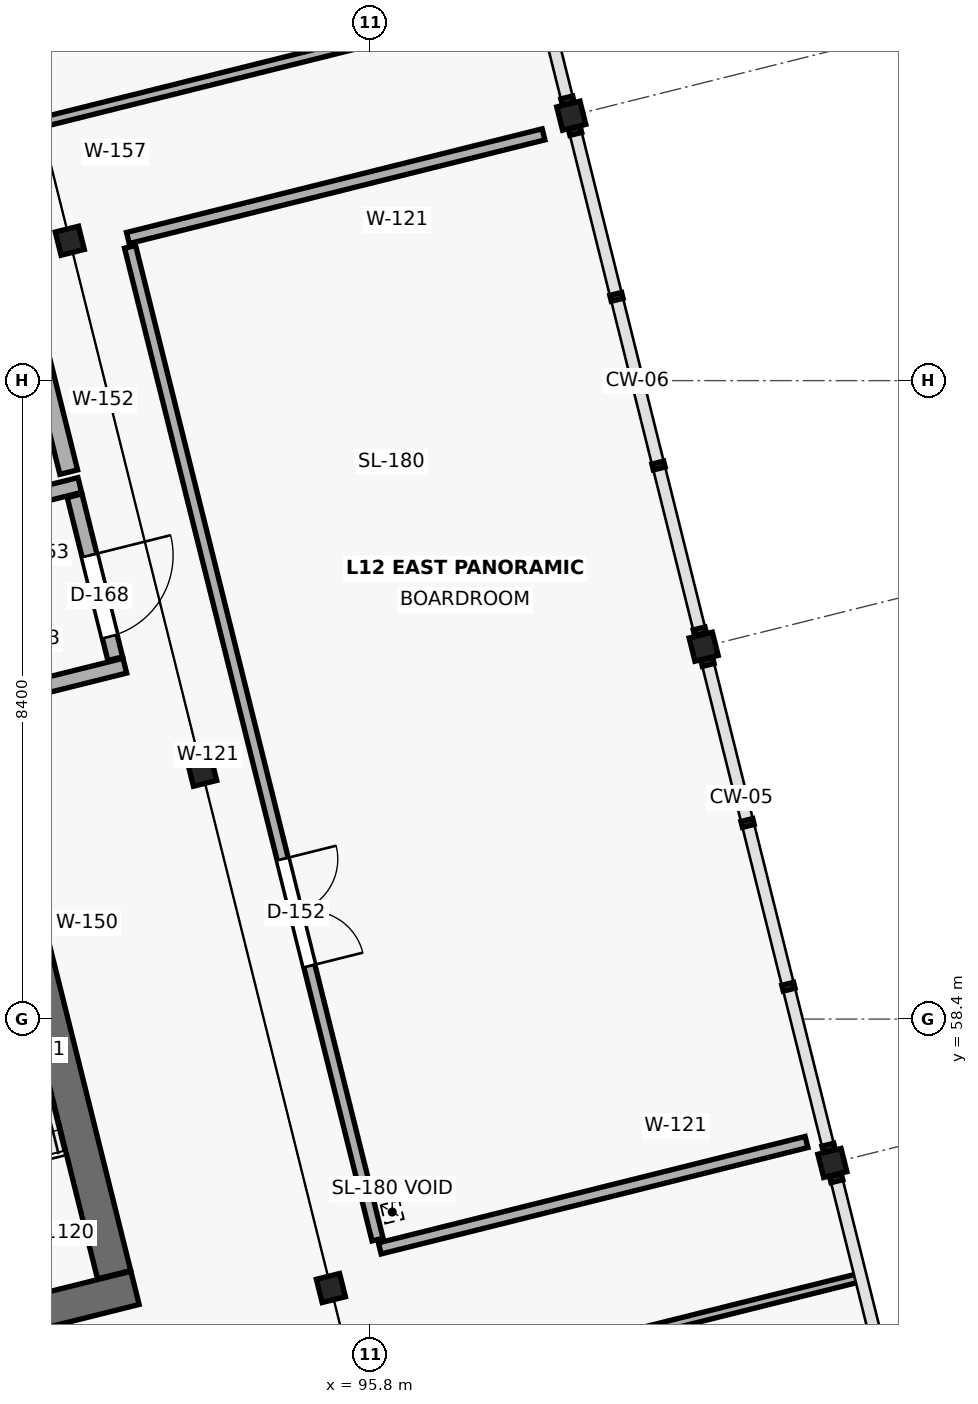
"""IFC4 building model, lengths in metres.
Left out: names, types, materials, properties, quantities, classifications, styles, units other than length and angle.
Written with IfcOpenShell. Run it as: python <this file> out.ifc"""

import sys

from ifc_helpers import new_model, si_unit, direction, frame, frame_2d, origin, origin_2d, place, context, subcontext, project, spatial, rectangle, extrude, element, fill, save


model = new_model("IFC4")
c1 = context("Model", 3, precision=1e-05, world=origin(), true_north=direction((0.0, 1.0)))
c2 = subcontext(c1, "Body", "Model", "MODEL_VIEW")
j1 = project(units=[si_unit("LENGTHUNIT", "METRE"), si_unit("PLANEANGLEUNIT", "RADIAN")], contexts=[c1])
p1 = place(None, origin())
s1 = spatial("IfcSite", under=j1, at=p1, CompositionType="ELEMENT")
p2 = place(p1, origin())
s2 = spatial("IfcBuilding", under=s1, at=p2, CompositionType="ELEMENT")
p3 = place(p2, frame((0.0, 0.0, 49.5)))
s3 = spatial("IfcBuildingStorey", under=s2, at=p3, CompositionType="ELEMENT", Elevation=49.5)
for number, where, z_axis, x_axis in (
    (1, (95.288, 54.862, 0.0), (0.0, 0.0, 1.0), (0.97, 0.242, 0.0)),
    (2, (93.594, 61.654, 0.0), (0.0, 0.0, 1.0), (0.97, 0.242, 0.0)),
    (3, (91.852, 68.64, 0.0), (0.0, 0.0, 1.0), (0.97, 0.242, 0.0)),
    (4, (101.885, 56.507, 0.0), (0.0, 0.0, 1.0), (0.97, 0.242, 0.0)),
    (5, (100.192, 63.299, 0.0), (0.0, 0.0, 1.0), (0.97, 0.242, 0.0)),
    (6, (98.45, 70.285, 0.0), (0.0, 0.0, 1.0), (0.97, 0.242, 0.0)),
):
    element("IfcColumn", number, at=place(p3, frame(where, z_axis=z_axis, x_axis=x_axis)), inside=s3, PredefinedType="COLUMN", context=c2, shape_type="SweptSolid", body=[
        extrude(rectangle(XDim=0.315, YDim=0.315, at=origin_2d()), origin(), (0.0, 0.0, 1.0), 3.9),
    ])
p4 = place(p3, frame((88.538, 53.823, 0.0), z_axis=(0.0, 0.0, 1.0), x_axis=(0.970295933763, 0.241921063415, 0.0)))
e7 = element("IfcWall", 7, at=p4, inside=s3, PredefinedType="SHEAR", context=c2, shape_type="SweptSolid", body=[
    extrude(rectangle(XDim=4.3, YDim=0.45, at=frame_2d((2.15, 0.0))), origin(), (0.0, 0.0, 1.0), 3.72),
])
p5 = place(p4, frame((1.575, 0.0, 0.0)))
e8 = element("IfcOpeningElement", 8, at=p5, cuts=e7, PredefinedType="OPENING", context=c2, shape_type="SweptSolid", body=[
    extrude(rectangle(XDim=1.15, YDim=2.2, at=frame_2d((0.575, 1.1))), frame((0.0, 0.237, 0.0), z_axis=(0.0, -1.0, 0.0), x_axis=(1.0, 0.0, 0.0)), (0.0, 0.0, 1.0), 0.474),
])
p6 = place(p3, frame((92.436, 55.037, 0.0), z_axis=(0.0, 0.0, 1.0), x_axis=(-0.241920660665, 0.970296034179, 0.0)))
e9 = element("IfcWall", 9, at=p6, inside=s3, PredefinedType="SHEAR", context=c2, shape_type="SweptSolid", body=[
    extrude(rectangle(XDim=7.38, YDim=0.45, at=frame_2d((3.69, 0.0))), origin(), (0.0, 0.0, 1.0), 3.72),
])
p7 = place(p3, frame((90.791, 62.604, 0.0), z_axis=(0.0, 0.0, 1.0), x_axis=(0.970306180373, 0.241879962645, 0.0)))
e10 = element("IfcWall", 10, at=p7, inside=s3, PredefinedType="STANDARD", context=c2, shape_type="SweptSolid", body=[
    extrude(rectangle(XDim=1.84, YDim=0.2, at=frame_2d((0.92, 0.0))), origin(), (0.0, 0.0, 1.0), 3.72),
])
p8 = place(p3, frame((89.218, 64.737, 0.0), z_axis=(0.0, 0.0, 1.0), x_axis=(0.97027839681, 0.241991389687, 0.0)))
e11 = element("IfcWall", 11, at=p8, inside=s3, PredefinedType="STANDARD", context=c2, shape_type="SweptSolid", body=[
    extrude(rectangle(XDim=2.85, YDim=0.2, at=frame_2d((1.425, 0.0))), origin(), (0.0, 0.0, 1.0), 3.72),
])
p9 = place(p3, frame((91.916, 65.286, 0.0), z_axis=(0.0, 0.0, 1.0), x_axis=(0.241911789465, -0.970298245963, 0.0)))
e12 = element("IfcWall", 12, at=p9, inside=s3, PredefinedType="STANDARD", context=c2, shape_type="SweptSolid", body=[
    extrude(rectangle(XDim=2.21, YDim=0.2, at=frame_2d((1.105, 0.0))), origin(), (0.0, 0.0, 1.0), 3.72),
])
p10 = place(p9, frame((0.81, 0.0, 0.0)))
e13 = element("IfcOpeningElement", 13, at=p10, cuts=e12, PredefinedType="OPENING", context=c2, shape_type="SweptSolid", body=[
    extrude(rectangle(XDim=1.1, YDim=2.2, at=frame_2d((0.55, 1.1))), frame((0.0, 0.112, 0.0), z_axis=(0.0, -1.0, 0.0), x_axis=(1.0, 0.0, 0.0)), (0.0, 0.0, 1.0), 0.224),
])
p11 = place(p3, frame((91.838, 65.596, 0.0), z_axis=(0.0, 0.0, 1.0), x_axis=(-0.2418676095, 0.970309259708, 0.0)))
e14 = element("IfcWall", 14, at=p11, inside=s3, PredefinedType="STANDARD", context=c2, shape_type="SweptSolid", body=[
    extrude(rectangle(XDim=2.15, YDim=0.24, at=frame_2d((1.075, 0.0))), origin(), (0.0, 0.0, 1.0), 3.72),
])
p12 = place(p3, frame((77.638, 66.745, 0.0), z_axis=(0.0, 0.0, 1.0), x_axis=(0.970296248646, 0.241919800477, 0.0)))
e15 = element("IfcWall", 15, at=p12, inside=s3, PredefinedType="PARTITIONING", context=c2, shape_type="SweptSolid", body=[
    extrude(rectangle(XDim=20.99, YDim=0.125, at=frame_2d((10.495, 0.0))), origin(), (0.0, 0.0, 1.0), 3.72),
])
p13 = place(p12, frame((8.681, 0.0, 0.0)))
e16 = element("IfcOpeningElement", 16, at=p13, cuts=e15, PredefinedType="OPENING", context=c2, shape_type="SweptSolid", body=[
    extrude(rectangle(XDim=1.65, YDim=2.35, at=frame_2d((0.825, 1.175))), frame((0.0, 0.074, 0.0), z_axis=(0.0, -1.0, 0.0), x_axis=(1.0, 0.0, 0.0)), (0.0, 0.0, 1.0), 0.149),
])
p14 = place(p3, frame((95.931, 55.383, 0.0), z_axis=(0.0, 0.0, 1.0), x_axis=(0.97029864505, 0.241910188735, 0.0)))
e17 = element("IfcWall", 17, at=p14, inside=s3, PredefinedType="PARTITIONING", context=c2, shape_type="SweptSolid", body=[
    extrude(rectangle(XDim=5.787, YDim=0.15, at=frame_2d((2.894, 0.0))), origin(), (0.0, 0.0, 1.0), 3.72),
])
p15 = place(p3, frame((98.085, 70.04, 0.0), z_axis=(0.0, 0.0, 1.0), x_axis=(-0.970300259832, -0.241903711774, 0.0)))
e18 = element("IfcWall", 18, at=p15, inside=s3, PredefinedType="PARTITIONING", context=c2, shape_type="SweptSolid", body=[
    extrude(rectangle(XDim=5.637, YDim=0.15, at=frame_2d((2.818, 0.0))), origin(), (0.0, 0.0, 1.0), 3.72),
])
p16 = place(p3, frame((92.645, 68.56, 0.0), z_axis=(0.0, 0.0, 1.0), x_axis=(0.241925285076, -0.970294881178, 0.0)))
e19 = element("IfcWall", 19, at=p16, inside=s3, PredefinedType="PARTITIONING", context=c2, shape_type="SweptSolid", body=[
    extrude(rectangle(XDim=13.46, YDim=0.15, at=frame_2d((6.73, 0.0))), origin(), (0.0, 0.0, 1.0), 3.72),
])
p17 = place(p16, frame((8.301, 0.0, 0.0)))
e20 = element("IfcOpeningElement", 20, at=p17, cuts=e19, PredefinedType="OPENING", context=c2, shape_type="SweptSolid", body=[
    extrude(rectangle(XDim=1.45, YDim=2.35, at=frame_2d((0.725, 1.175))), frame((0.0, 0.087, 0.0), z_axis=(0.0, -1.0, 0.0), x_axis=(1.0, 0.0, 0.0)), (0.0, 0.0, 1.0), 0.174),
])
p18 = place(p3, frame((102.202, 54.989, 0.0), z_axis=(0.0, 0.0, 1.0), x_axis=(-0.970296992455, -0.241916817175, 0.0)))
e21 = element("IfcWall", 21, at=p18, inside=s3, PredefinedType="PARTITIONING", context=c2, shape_type="SweptSolid", body=[
    extrude(rectangle(XDim=13.74, YDim=0.112, at=frame_2d((6.87, 0.0))), origin(), (0.0, 0.0, 1.0), 3.72),
])
p19 = place(p18, frame((7.578, 0.0, 0.0)))
e22 = element("IfcOpeningElement", 22, at=p19, cuts=e21, PredefinedType="OPENING", context=c2, shape_type="SweptSolid", body=[
    extrude(rectangle(XDim=1.0, YDim=2.25, at=frame_2d((0.5, 1.125))), frame((0.0, 0.068, 0.0), z_axis=(0.0, -1.0, 0.0), x_axis=(1.0, 0.0, 0.0)), (0.0, 0.0, 1.0), 0.136),
])
p20 = place(p10, origin())
e23 = element("IfcDoor", 23, at=p20, inside=s3, OperationType="SINGLE_SWING_LEFT", PredefinedType="DOOR", context=c2, shape_type="SweptSolid", body=[
    extrude(rectangle(XDim=1.1, YDim=2.2, at=frame_2d((0.55, 1.1))), frame((0.0, 0.025, 0.0), z_axis=(0.0, -1.0, 0.0), x_axis=(1.0, 0.0, 0.0)), (0.0, 0.0, 1.0), 0.05),
])
fill(e13, e23)
p21 = place(p17, origin())
e24 = element("IfcDoor", 24, at=p21, inside=s3, OperationType="DOUBLE_DOOR_SINGLE_SWING", PredefinedType="DOOR", context=c2, shape_type="SweptSolid", body=[
    extrude(rectangle(XDim=1.45, YDim=2.35, at=frame_2d((0.725, 1.175))), frame((0.0, 0.025, 0.0), z_axis=(0.0, -1.0, 0.0), x_axis=(1.0, 0.0, 0.0)), (0.0, 0.0, 1.0), 0.05),
])
fill(e20, e24)
save(model, sys.argv[1])
